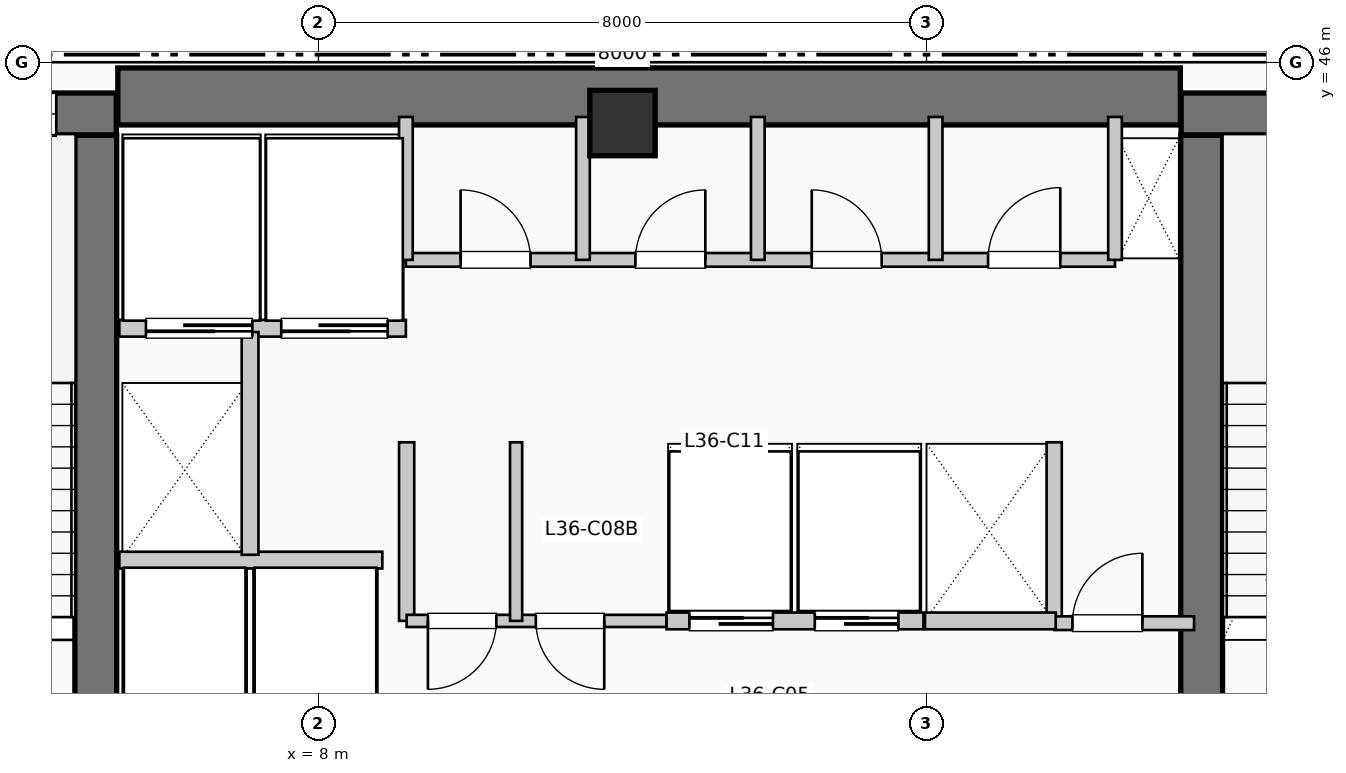
"""IFC4 building model, lengths in metres.
Left out: names, types, materials, properties, quantities, classifications, styles, units other than length and angle.
Written with IfcOpenShell. Run it as: python <this file> out.ifc"""

import sys

from ifc_helpers import new_model, si_unit, direction, frame, frame_2d, origin, origin_2d, place, context, subcontext, project, spatial, rectangle, extrude, element, fill, save


model = new_model("IFC4")
c1 = context("Model", 3, precision=1e-05, world=origin(), true_north=direction((0.0, 1.0)))
c2 = subcontext(c1, "Body", "Model", "MODEL_VIEW")
j1 = project(units=[si_unit("LENGTHUNIT", "METRE"), si_unit("PLANEANGLEUNIT", "RADIAN")], contexts=[c1])
p1 = place(None, origin())
s1 = spatial("IfcSite", under=j1, at=p1, CompositionType="ELEMENT")
p2 = place(p1, origin())
s2 = spatial("IfcBuilding", under=s1, at=p2, CompositionType="ELEMENT")
p3 = place(p2, frame((0.0, 0.0, 150.81)))
s3 = spatial("IfcBuildingStorey", under=s2, at=p3, CompositionType="ELEMENT", Elevation=150.81)
p4 = place(p3, frame((5.36, 45.55, 0.0), z_axis=(0.0, 0.0, 1.0), x_axis=(1.0, 0.0, 0.0)))
e1 = element("IfcWall", 1, at=p4, inside=s3, PredefinedType="SHEAR", context=c2, shape_type="SweptSolid", body=[
    extrude(rectangle(XDim=13.98, YDim=0.75, at=frame_2d((6.99, 0.0))), origin(), (0.0, 0.0, 1.0), 3.96),
])
p5 = place(p3, frame((5.07, 37.15, 0.0), z_axis=(0.0, 0.0, 1.0), x_axis=(0.0, 1.0, 0.0)))
e2 = element("IfcWall", 2, at=p5, inside=s3, PredefinedType="SHEAR", context=c2, shape_type="SweptSolid", body=[
    extrude(rectangle(XDim=7.89, YDim=0.55, at=frame_2d((3.945, 0.0))), origin(), (0.0, 0.0, 1.0), 3.96),
])
p6 = place(p3, frame((1.1, 45.32, 0.0), z_axis=(0.0, 0.0, 1.0), x_axis=(1.0, 0.0, 0.0)))
e3 = element("IfcWall", 3, at=p6, inside=s3, PredefinedType="SHEAR", context=c2, shape_type="SweptSolid", body=[
    extrude(rectangle(XDim=4.24, YDim=0.55, at=frame_2d((2.12, 0.0))), origin(), (0.0, 0.0, 1.0), 3.96),
])
p7 = place(p6, frame((2.05, 0.0, 1.05)))
e4 = element("IfcOpeningElement", 4, at=p7, cuts=e3, PredefinedType="OPENING", context=c2, shape_type="SweptSolid", body=[
    extrude(rectangle(XDim=1.4, YDim=1.8, at=frame_2d((0.7, 0.9))), frame((0.0, 0.285, 0.0), z_axis=(0.0, -1.0, 0.0), x_axis=(1.0, 0.0, 0.0)), (0.0, 0.0, 1.0), 0.57),
])
p8 = place(p3, frame((19.62, 37.15, 0.0), z_axis=(0.0, 0.0, 1.0), x_axis=(0.0, 1.0, 0.0)))
e5 = element("IfcWall", 5, at=p8, inside=s3, PredefinedType="SHEAR", context=c2, shape_type="SweptSolid", body=[
    extrude(rectangle(XDim=7.89, YDim=0.55, at=frame_2d((3.945, 0.0))), origin(), (0.0, 0.0, 1.0), 3.96),
])
p9 = place(p3, frame((19.35, 45.32, 0.0), z_axis=(0.0, 0.0, 1.0), x_axis=(1.0, 0.0, 0.0)))
e6 = element("IfcWall", 6, at=p9, inside=s3, PredefinedType="SHEAR", context=c2, shape_type="SweptSolid", body=[
    extrude(rectangle(XDim=3.69, YDim=0.55, at=frame_2d((1.845, 0.0))), origin(), (0.0, 0.0, 1.0), 3.96),
])
p10 = place(p9, frame((1.15, 0.0, 1.05)))
e7 = element("IfcOpeningElement", 7, at=p10, cuts=e6, PredefinedType="OPENING", context=c2, shape_type="SweptSolid", body=[
    extrude(rectangle(XDim=1.4, YDim=1.8, at=frame_2d((0.7, 0.9))), frame((0.0, 0.285, 0.0), z_axis=(0.0, -1.0, 0.0), x_axis=(1.0, 0.0, 0.0)), (0.0, 0.0, 1.0), 0.57),
])
p11 = place(p3, frame((12.0, 45.2, 0.0), z_axis=(0.0, 0.0, 1.0), x_axis=(1.0, 0.0, 0.0)))
e8 = element("IfcColumn", 8, at=p11, inside=s3, PredefinedType="COLUMN", context=c2, shape_type="SweptSolid", body=[
    extrude(rectangle(XDim=0.86, YDim=0.86, at=origin_2d()), origin(), (0.0, 0.0, 1.0), 3.96),
])
p12 = place(p3, frame((5.38, 39.45, 0.0), z_axis=(0.0, 0.0, 1.0), x_axis=(1.0, 0.0, 0.0)))
e9 = element("IfcWall", 9, at=p12, inside=s3, PredefinedType="PARTITIONING", context=c2, shape_type="SweptSolid", body=[
    extrude(rectangle(XDim=3.46, YDim=0.22, at=frame_2d((1.73, 0.0))), origin(), (0.0, 0.0, 1.0), 3.71),
])
p13 = place(p3, frame((5.38, 42.5, 0.0), z_axis=(0.0, 0.0, 1.0), x_axis=(1.0, 0.0, 0.0)))
e10 = element("IfcWall", 10, at=p13, inside=s3, PredefinedType="PARTITIONING", context=c2, shape_type="SweptSolid", body=[
    extrude(rectangle(XDim=3.77, YDim=0.22, at=frame_2d((1.885, 0.0))), origin(), (0.0, 0.0, 1.0), 3.71),
])
p14 = place(p13, frame((1.75, 0.0, 0.0), z_axis=(0.0, 0.0, 1.0), x_axis=(-1.0, 0.0, 0.0)))
e11 = element("IfcOpeningElement", 11, at=p14, cuts=e10, PredefinedType="OPENING", context=c2, shape_type="SweptSolid", body=[
    extrude(rectangle(XDim=1.4, YDim=2.2, at=frame_2d((0.7, 1.1))), frame((0.0, 0.12, 0.0), z_axis=(0.0, -1.0, 0.0), x_axis=(1.0, 0.0, 0.0)), (0.0, 0.0, 1.0), 0.24),
])
p15 = place(p13, frame((3.53, 0.0, 0.0), z_axis=(0.0, 0.0, 1.0), x_axis=(-1.0, 0.0, 0.0)))
e12 = element("IfcOpeningElement", 12, at=p15, cuts=e10, PredefinedType="OPENING", context=c2, shape_type="SweptSolid", body=[
    extrude(rectangle(XDim=1.4, YDim=2.2, at=frame_2d((0.7, 1.1))), frame((0.0, 0.12, 0.0), z_axis=(0.0, -1.0, 0.0), x_axis=(1.0, 0.0, 0.0)), (0.0, 0.0, 1.0), 0.24),
])
p16 = place(p3, frame((7.1, 39.52, 0.0), z_axis=(0.0, 0.0, 1.0), x_axis=(0.0, 1.0, 0.0)))
e13 = element("IfcWall", 13, at=p16, inside=s3, PredefinedType="PARTITIONING", context=c2, shape_type="SweptSolid", body=[
    extrude(rectangle(XDim=2.93, YDim=0.22, at=frame_2d((1.465, 0.0))), origin(), (0.0, 0.0, 1.0), 3.71),
])
for number, where, z_axis, x_axis in (
    (14, (9.16, 38.65, 0.0), (0.0, 0.0, 1.0), (0.0, 1.0, 0.0)),
    (15, (17.68, 38.65, 0.0), (0.0, 0.0, 1.0), (0.0, 1.0, 0.0)),
):
    element("IfcWall", number, at=place(p3, frame(where, z_axis=z_axis, x_axis=x_axis)), inside=s3, PredefinedType="PARTITIONING", context=c2, shape_type="SweptSolid", body=[
        extrude(rectangle(XDim=2.35, YDim=0.2, at=frame_2d((1.175, 0.0))), origin(), (0.0, 0.0, 1.0), 3.71),
    ])
p17 = place(p3, frame((17.68, 38.62, 0.0), z_axis=(0.0, 0.0, 1.0), x_axis=(1.0, 0.0, 0.0)))
e16 = element("IfcWall", 16, at=p17, inside=s3, PredefinedType="PARTITIONING", context=c2, shape_type="SweptSolid", body=[
    extrude(rectangle(XDim=1.84, YDim=0.18, at=frame_2d((0.92, 0.0))), origin(), (0.0, 0.0, 1.0), 3.71),
])
p18 = place(p17, frame((0.24, 0.0, 0.0)))
e17 = element("IfcOpeningElement", 17, at=p18, cuts=e16, PredefinedType="OPENING", context=c2, shape_type="SweptSolid", body=[
    extrude(rectangle(XDim=0.92, YDim=2.1, at=frame_2d((0.46, 1.05))), frame((0.0, 0.1, 0.0), z_axis=(0.0, -1.0, 0.0), x_axis=(1.0, 0.0, 0.0)), (0.0, 0.0, 1.0), 0.2),
])
p19 = place(p3, frame((9.16, 38.65, 0.0), z_axis=(0.0, 0.0, 1.0), x_axis=(1.0, 0.0, 0.0)))
e18 = element("IfcWall", 18, at=p19, inside=s3, PredefinedType="PARTITIONING", context=c2, shape_type="SweptSolid", body=[
    extrude(rectangle(XDim=3.42, YDim=0.16, at=frame_2d((1.71, 0.0))), origin(), (0.0, 0.0, 1.0), 3.71),
])
p20 = place(p19, frame((1.18, 0.0, 0.0), z_axis=(0.0, 0.0, 1.0), x_axis=(-1.0, 0.0, 0.0)))
e19 = element("IfcOpeningElement", 19, at=p20, cuts=e18, PredefinedType="OPENING", context=c2, shape_type="SweptSolid", body=[
    extrude(rectangle(XDim=0.9, YDim=2.15, at=frame_2d((0.45, 1.075))), frame((0.0, 0.09, 0.0), z_axis=(0.0, -1.0, 0.0), x_axis=(1.0, 0.0, 0.0)), (0.0, 0.0, 1.0), 0.18),
])
p21 = place(p19, frame((2.6, 0.0, 0.0), z_axis=(0.0, 0.0, 1.0), x_axis=(-1.0, 0.0, 0.0)))
e20 = element("IfcOpeningElement", 20, at=p21, cuts=e18, PredefinedType="OPENING", context=c2, shape_type="SweptSolid", body=[
    extrude(rectangle(XDim=0.9, YDim=2.15, at=frame_2d((0.45, 1.075))), frame((0.0, 0.09, 0.0), z_axis=(0.0, -1.0, 0.0), x_axis=(1.0, 0.0, 0.0)), (0.0, 0.0, 1.0), 0.18),
])
p22 = place(p3, frame((10.6, 38.65, 0.0), z_axis=(0.0, 0.0, 1.0), x_axis=(0.0, 1.0, 0.0)))
e21 = element("IfcWall", 21, at=p22, inside=s3, PredefinedType="PARTITIONING", context=c2, shape_type="SweptSolid", body=[
    extrude(rectangle(XDim=2.35, YDim=0.16, at=frame_2d((1.175, 0.0))), origin(), (0.0, 0.0, 1.0), 3.71),
])
p23 = place(p3, frame((12.58, 38.65, 0.0), z_axis=(0.0, 0.0, 1.0), x_axis=(1.0, 0.0, 0.0)))
e22 = element("IfcWall", 22, at=p23, inside=s3, PredefinedType="PARTITIONING", context=c2, shape_type="SweptSolid", body=[
    extrude(rectangle(XDim=3.38, YDim=0.22, at=frame_2d((1.69, 0.0))), origin(), (0.0, 0.0, 1.0), 3.71),
])
p24 = place(p23, frame((0.3, 0.0, 0.0)))
e23 = element("IfcOpeningElement", 23, at=p24, cuts=e22, PredefinedType="OPENING", context=c2, shape_type="SweptSolid", body=[
    extrude(rectangle(XDim=1.1, YDim=2.2, at=frame_2d((0.55, 1.1))), frame((0.0, 0.12, 0.0), z_axis=(0.0, -1.0, 0.0), x_axis=(1.0, 0.0, 0.0)), (0.0, 0.0, 1.0), 0.24),
])
p25 = place(p23, frame((1.95, 0.0, 0.0)))
e24 = element("IfcOpeningElement", 24, at=p25, cuts=e22, PredefinedType="OPENING", context=c2, shape_type="SweptSolid", body=[
    extrude(rectangle(XDim=1.1, YDim=2.2, at=frame_2d((0.55, 1.1))), frame((0.0, 0.12, 0.0), z_axis=(0.0, -1.0, 0.0), x_axis=(1.0, 0.0, 0.0)), (0.0, 0.0, 1.0), 0.24),
])
p26 = place(p3, frame((15.98, 38.65, 0.0), z_axis=(0.0, 0.0, 1.0), x_axis=(1.0, 0.0, 0.0)))
e25 = element("IfcWall", 25, at=p26, inside=s3, PredefinedType="PARTITIONING", context=c2, shape_type="SweptSolid", body=[
    extrude(rectangle(XDim=1.72, YDim=0.22, at=frame_2d((0.86, 0.0))), origin(), (0.0, 0.0, 1.0), 3.71),
])
p27 = place(p3, frame((9.15, 43.4, 0.0), z_axis=(0.0, 0.0, 1.0), x_axis=(1.0, 0.0, 0.0)))
e26 = element("IfcWall", 26, at=p27, inside=s3, PredefinedType="PLUMBINGWALL", context=c2, shape_type="SweptSolid", body=[
    extrude(rectangle(XDim=9.33, YDim=0.18, at=frame_2d((4.665, 0.0))), origin(), (0.0, 0.0, 1.0), 3.71),
])
p28 = place(p27, frame((0.72, 0.0, 0.0)))
e27 = element("IfcOpeningElement", 27, at=p28, cuts=e26, PredefinedType="OPENING", context=c2, shape_type="SweptSolid", body=[
    extrude(rectangle(XDim=0.92, YDim=2.1, at=frame_2d((0.46, 1.05))), frame((0.0, 0.1, 0.0), z_axis=(0.0, -1.0, 0.0), x_axis=(1.0, 0.0, 0.0)), (0.0, 0.0, 1.0), 0.2),
])
p29 = place(p27, frame((3.02, 0.0, 0.0)))
e28 = element("IfcOpeningElement", 28, at=p29, cuts=e26, PredefinedType="OPENING", context=c2, shape_type="SweptSolid", body=[
    extrude(rectangle(XDim=0.92, YDim=2.1, at=frame_2d((0.46, 1.05))), frame((0.0, 0.1, 0.0), z_axis=(0.0, -1.0, 0.0), x_axis=(1.0, 0.0, 0.0)), (0.0, 0.0, 1.0), 0.2),
])
p30 = place(p27, frame((5.34, 0.0, 0.0)))
e29 = element("IfcOpeningElement", 29, at=p30, cuts=e26, PredefinedType="OPENING", context=c2, shape_type="SweptSolid", body=[
    extrude(rectangle(XDim=0.92, YDim=2.1, at=frame_2d((0.46, 1.05))), frame((0.0, 0.1, 0.0), z_axis=(0.0, -1.0, 0.0), x_axis=(1.0, 0.0, 0.0)), (0.0, 0.0, 1.0), 0.2),
])
p31 = place(p27, frame((7.66, 0.0, 0.0)))
e30 = element("IfcOpeningElement", 30, at=p31, cuts=e26, PredefinedType="OPENING", context=c2, shape_type="SweptSolid", body=[
    extrude(rectangle(XDim=0.95, YDim=2.1, at=frame_2d((0.475, 1.05))), frame((0.0, 0.1, 0.0), z_axis=(0.0, -1.0, 0.0), x_axis=(1.0, 0.0, 0.0)), (0.0, 0.0, 1.0), 0.2),
])
for number, where, z_axis, x_axis in (
    (31, (9.15, 43.4, 0.0), (0.0, 0.0, 1.0), (0.0, 1.0, 0.0)),
    (32, (18.48, 43.4, 0.0), (0.0, 0.0, 1.0), (0.0, 1.0, 0.0)),
    (33, (11.48, 43.4, 0.0), (0.0, 0.0, 1.0), (0.0, 1.0, 0.0)),
    (34, (13.78, 43.4, 0.0), (0.0, 0.0, 1.0), (0.0, 1.0, 0.0)),
    (35, (16.12, 43.4, 0.0), (0.0, 0.0, 1.0), (0.0, 1.0, 0.0)),
):
    element("IfcWall", number, at=place(p3, frame(where, z_axis=z_axis, x_axis=x_axis)), inside=s3, PredefinedType="PLUMBINGWALL", context=c2, shape_type="SweptSolid", body=[
        extrude(rectangle(XDim=1.88, YDim=0.18, at=frame_2d((0.94, 0.0))), origin(), (0.0, 0.0, 1.0), 3.71),
    ])
p32 = place(p7, origin())
e36 = element("IfcWindow", 36, at=p32, inside=s3, PartitioningType="SINGLE_PANEL", PredefinedType="WINDOW", context=c2, shape_type="SweptSolid", body=[
    extrude(rectangle(XDim=1.4, YDim=1.8, at=frame_2d((0.7, 0.9))), frame((0.0, 0.03, 0.0), z_axis=(0.0, -1.0, 0.0), x_axis=(1.0, 0.0, 0.0)), (0.0, 0.0, 1.0), 0.06),
])
fill(e4, e36)
p33 = place(p14, origin())
e37 = element("IfcDoor", 37, at=p33, inside=s3, OperationType="SLIDING_TO_LEFT", PredefinedType="DOOR", context=c2, shape_type="SweptSolid", body=[
    extrude(rectangle(XDim=1.4, YDim=2.2, at=frame_2d((0.7, 1.1))), frame((0.0, 0.025, 0.0), z_axis=(0.0, -1.0, 0.0), x_axis=(1.0, 0.0, 0.0)), (0.0, 0.0, 1.0), 0.05),
])
fill(e11, e37)
p34 = place(p15, origin())
e38 = element("IfcDoor", 38, at=p34, inside=s3, OperationType="SLIDING_TO_LEFT", PredefinedType="DOOR", context=c2, shape_type="SweptSolid", body=[
    extrude(rectangle(XDim=1.4, YDim=2.2, at=frame_2d((0.7, 1.1))), frame((0.0, 0.025, 0.0), z_axis=(0.0, -1.0, 0.0), x_axis=(1.0, 0.0, 0.0)), (0.0, 0.0, 1.0), 0.05),
])
fill(e12, e38)
p35 = place(p18, origin())
e39 = element("IfcDoor", 39, at=p35, inside=s3, OperationType="SINGLE_SWING_RIGHT", PredefinedType="DOOR", context=c2, shape_type="SweptSolid", body=[
    extrude(rectangle(XDim=0.92, YDim=2.1, at=frame_2d((0.46, 1.05))), frame((0.0, 0.025, 0.0), z_axis=(0.0, -1.0, 0.0), x_axis=(1.0, 0.0, 0.0)), (0.0, 0.0, 1.0), 0.05),
])
fill(e17, e39)
p36 = place(p20, origin())
e40 = element("IfcDoor", 40, at=p36, inside=s3, OperationType="SINGLE_SWING_LEFT", PredefinedType="DOOR", context=c2, shape_type="SweptSolid", body=[
    extrude(rectangle(XDim=0.9, YDim=2.15, at=frame_2d((0.45, 1.075))), frame((0.0, 0.025, 0.0), z_axis=(0.0, -1.0, 0.0), x_axis=(1.0, 0.0, 0.0)), (0.0, 0.0, 1.0), 0.05),
])
fill(e19, e40)
p37 = place(p21, origin())
e41 = element("IfcDoor", 41, at=p37, inside=s3, OperationType="SINGLE_SWING_RIGHT", PredefinedType="DOOR", context=c2, shape_type="SweptSolid", body=[
    extrude(rectangle(XDim=0.9, YDim=2.15, at=frame_2d((0.45, 1.075))), frame((0.0, 0.025, 0.0), z_axis=(0.0, -1.0, 0.0), x_axis=(1.0, 0.0, 0.0)), (0.0, 0.0, 1.0), 0.05),
])
fill(e20, e41)
p38 = place(p24, origin())
e42 = element("IfcDoor", 42, at=p38, inside=s3, OperationType="SLIDING_TO_RIGHT", PredefinedType="DOOR", context=c2, shape_type="SweptSolid", body=[
    extrude(rectangle(XDim=1.1, YDim=2.2, at=frame_2d((0.55, 1.1))), frame((0.0, 0.025, 0.0), z_axis=(0.0, -1.0, 0.0), x_axis=(1.0, 0.0, 0.0)), (0.0, 0.0, 1.0), 0.05),
])
fill(e23, e42)
p39 = place(p25, origin())
e43 = element("IfcDoor", 43, at=p39, inside=s3, OperationType="SLIDING_TO_RIGHT", PredefinedType="DOOR", context=c2, shape_type="SweptSolid", body=[
    extrude(rectangle(XDim=1.1, YDim=2.2, at=frame_2d((0.55, 1.1))), frame((0.0, 0.025, 0.0), z_axis=(0.0, -1.0, 0.0), x_axis=(1.0, 0.0, 0.0)), (0.0, 0.0, 1.0), 0.05),
])
fill(e24, e43)
p40 = place(p28, origin())
e44 = element("IfcDoor", 44, at=p40, inside=s3, OperationType="SINGLE_SWING_LEFT", PredefinedType="DOOR", context=c2, shape_type="SweptSolid", body=[
    extrude(rectangle(XDim=0.92, YDim=2.1, at=frame_2d((0.46, 1.05))), frame((0.0, 0.025, 0.0), z_axis=(0.0, -1.0, 0.0), x_axis=(1.0, 0.0, 0.0)), (0.0, 0.0, 1.0), 0.05),
])
fill(e27, e44)
p41 = place(p29, origin())
e45 = element("IfcDoor", 45, at=p41, inside=s3, OperationType="SINGLE_SWING_RIGHT", PredefinedType="DOOR", context=c2, shape_type="SweptSolid", body=[
    extrude(rectangle(XDim=0.92, YDim=2.1, at=frame_2d((0.46, 1.05))), frame((0.0, 0.025, 0.0), z_axis=(0.0, -1.0, 0.0), x_axis=(1.0, 0.0, 0.0)), (0.0, 0.0, 1.0), 0.05),
])
fill(e28, e45)
p42 = place(p30, origin())
e46 = element("IfcDoor", 46, at=p42, inside=s3, OperationType="SINGLE_SWING_LEFT", PredefinedType="DOOR", context=c2, shape_type="SweptSolid", body=[
    extrude(rectangle(XDim=0.92, YDim=2.1, at=frame_2d((0.46, 1.05))), frame((0.0, 0.025, 0.0), z_axis=(0.0, -1.0, 0.0), x_axis=(1.0, 0.0, 0.0)), (0.0, 0.0, 1.0), 0.05),
])
fill(e29, e46)
p43 = place(p31, origin())
e47 = element("IfcDoor", 47, at=p43, inside=s3, OperationType="SINGLE_SWING_RIGHT", PredefinedType="DOOR", context=c2, shape_type="SweptSolid", body=[
    extrude(rectangle(XDim=0.95, YDim=2.1, at=frame_2d((0.475, 1.05))), frame((0.0, 0.025, 0.0), z_axis=(0.0, -1.0, 0.0), x_axis=(1.0, 0.0, 0.0)), (0.0, 0.0, 1.0), 0.05),
])
fill(e30, e47)
save(model, sys.argv[1])
